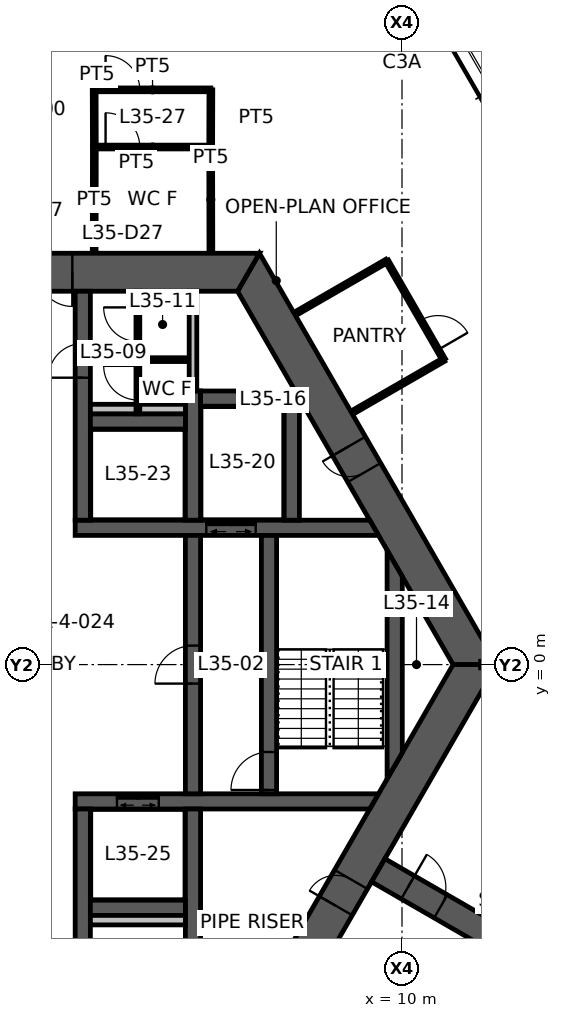
"""IFC4 building model, lengths in metres.
Left out: names, types, materials, properties, quantities, classifications, styles, units other than length and angle.
Written with IfcOpenShell. Run it as: python <this file> out.ifc"""

import sys

from ifc_helpers import new_model, si_unit, direction, frame, frame_2d, origin, place, context, subcontext, project, spatial, polyline, rectangle, outline, extrude, element, fill, save


model = new_model("IFC4")
c1 = context("Model", 3, precision=1e-05, world=origin(), true_north=direction((0.0, 1.0)))
c2 = subcontext(c1, "Body", "Model", "MODEL_VIEW")
j1 = project(units=[si_unit("LENGTHUNIT", "METRE"), si_unit("PLANEANGLEUNIT", "RADIAN")], contexts=[c1])
p1 = place(None, origin())
s1 = spatial("IfcSite", under=j1, at=p1, CompositionType="ELEMENT")
p2 = place(p1, origin())
s2 = spatial("IfcBuilding", under=s1, at=p2, CompositionType="ELEMENT")
p3 = place(p2, frame((0.0, 0.0, 140.9)))
s3 = spatial("IfcBuildingStorey", under=s2, at=p3, CompositionType="ELEMENT", Elevation=140.9)
p4 = place(p3, frame((11.922, 0.0, 0.0), z_axis=(0.0, 0.0, 1.0), x_axis=(-0.500004296715, 0.866022923061, 0.0)))
e1 = element("IfcWall", 1, at=p4, inside=s3, PredefinedType="SHEAR", context=c2, shape_type="SweptSolid", body=[
    extrude(outline(polyline([(-0.289, -0.5), (5.835, -0.5), (6.635, -0.5), (12.211, -0.5), (11.634, 0.5), (6.635, 0.5), (5.835, 0.5), (0.289, 0.5), (-0.289, -0.5)])), origin(), (0.0, 0.0, 1.0), 3.9),
])
p5 = place(p4, frame((5.835, 0.0, 0.0)))
e2 = element("IfcOpeningElement", 2, at=p5, cuts=e1, PredefinedType="OPENING", context=c2, shape_type="SweptSolid", body=[
    extrude(rectangle(XDim=0.8, YDim=2.1, at=frame_2d((0.4, 1.05))), frame((0.0, 0.51, 0.0), z_axis=(0.0, -1.0, 0.0), x_axis=(1.0, 0.0, 0.0)), (0.0, 0.0, 1.0), 1.02),
])
p6 = place(p3, frame((5.961, 10.325, 0.0), z_axis=(0.0, 0.0, 1.0), x_axis=(-1.0, 0.0, 0.0)))
e3 = element("IfcWall", 3, at=p6, inside=s3, PredefinedType="SHEAR", context=c2, shape_type="SweptSolid", body=[
    extrude(outline(polyline([(-0.289, -0.5), (4.636, -0.5), (5.536, -0.5), (6.386, -0.5), (7.286, -0.5), (12.211, -0.5), (11.634, 0.5), (7.286, 0.5), (6.386, 0.5), (5.536, 0.5), (4.636, 0.5), (0.289, 0.5), (-0.289, -0.5)])), origin(), (0.0, 0.0, 1.0), 3.9),
])
p7 = place(p6, frame((6.386, 0.0, 0.0)))
e4 = element("IfcOpeningElement", 4, at=p7, cuts=e3, PredefinedType="OPENING", context=c2, shape_type="SweptSolid", body=[
    extrude(rectangle(XDim=0.9, YDim=2.1, at=frame_2d((0.45, 1.05))), frame((0.0, 0.51, 0.0), z_axis=(0.0, -1.0, 0.0), x_axis=(1.0, 0.0, 0.0)), (0.0, 0.0, 1.0), 1.02),
])
p8 = place(p6, frame((4.636, 0.0, 0.0)))
e5 = element("IfcOpeningElement", 5, at=p8, cuts=e3, PredefinedType="OPENING", context=c2, shape_type="SweptSolid", body=[
    extrude(rectangle(XDim=0.9, YDim=2.1, at=frame_2d((0.45, 1.05))), frame((0.0, 0.51, 0.0), z_axis=(0.0, -1.0, 0.0), x_axis=(1.0, 0.0, 0.0)), (0.0, 0.0, 1.0), 1.02),
])
p9 = place(p3, frame((5.961, -10.325, 0.0), z_axis=(0.0, 0.0, 1.0), x_axis=(0.500004296715, 0.866022923061, 0.0)))
e6 = element("IfcWall", 6, at=p9, inside=s3, PredefinedType="SHEAR", context=c2, shape_type="SweptSolid", body=[
    extrude(outline(polyline([(-0.289, -0.5), (4.594, -0.5), (5.394, -0.5), (12.211, -0.5), (11.634, 0.5), (5.394, 0.5), (4.594, 0.5), (0.289, 0.5), (-0.289, -0.5)])), origin(), (0.0, 0.0, 1.0), 3.9),
])
p10 = place(p9, frame((4.594, 0.0, 0.0)))
e7 = element("IfcOpeningElement", 7, at=p10, cuts=e6, PredefinedType="OPENING", context=c2, shape_type="SweptSolid", body=[
    extrude(rectangle(XDim=0.8, YDim=2.1, at=frame_2d((0.4, 1.05))), frame((0.0, 0.51, 0.0), z_axis=(0.0, -1.0, 0.0), x_axis=(1.0, 0.0, 0.0)), (0.0, 0.0, 1.0), 1.02),
])
p11 = place(p3, frame((9.375, -5.413, 0.0), z_axis=(0.0, 0.0, 1.0), x_axis=(0.866032377459, -0.499987921047, 0.0)))
e8 = element("IfcWall", 8, at=p11, inside=s3, PredefinedType="SHEAR", context=c2, shape_type="SweptSolid", body=[
    extrude(rectangle(XDim=7.696, YDim=0.7, at=frame_2d((3.848, 0.0))), origin(), (0.0, 0.0, 1.0), 3.9),
])
p12 = place(p11, frame((0.9, 0.0, 0.0)))
e9 = element("IfcOpeningElement", 9, at=p12, cuts=e8, PredefinedType="OPENING", context=c2, shape_type="SweptSolid", body=[
    extrude(rectangle(XDim=1.0, YDim=2.1, at=frame_2d((0.5, 1.05))), frame((0.0, 0.36, 0.0), z_axis=(0.0, -1.0, 0.0), x_axis=(1.0, 0.0, 0.0)), (0.0, 0.0, 1.0), 0.72),
])
p13 = place(p3, frame((1.4, 3.6, 0.0), z_axis=(0.0, 0.0, 1.0), x_axis=(1.0, 0.0, 0.0)))
e10 = element("IfcWall", 10, at=p13, inside=s3, PredefinedType="SHEAR", context=c2, shape_type="SweptSolid", body=[
    extrude(outline(polyline([(0.0, -0.2), (3.45, -0.2), (4.75, -0.2), (7.982, -0.2), (7.751, 0.2), (4.75, 0.2), (3.45, 0.2), (0.0, 0.2), (0.0, -0.2)])), origin(), (0.0, 0.0, 1.0), 3.9),
])
p14 = place(p13, frame((3.45, 0.0, 0.0)))
e11 = element("IfcOpeningElement", 11, at=p14, cuts=e10, PredefinedType="OPENING", context=c2, shape_type="SweptSolid", body=[
    extrude(rectangle(XDim=1.3, YDim=2.1, at=frame_2d((0.65, 1.05))), frame((0.0, 0.21, 0.0), z_axis=(0.0, -1.0, 0.0), x_axis=(1.0, 0.0, 0.0)), (0.0, 0.0, 1.0), 0.42),
])
p15 = place(p3, frame((1.4, -3.6, 0.0), z_axis=(0.0, 0.0, 1.0), x_axis=(1.0, 0.0, 0.0)))
e12 = element("IfcWall", 12, at=p15, inside=s3, PredefinedType="SHEAR", context=c2, shape_type="SweptSolid", body=[
    extrude(outline(polyline([(0.0, -0.2), (1.1, -0.2), (2.2, -0.2), (7.751, -0.2), (7.982, 0.2), (2.2, 0.2), (1.1, 0.2), (0.0, 0.2), (0.0, -0.2)])), origin(), (0.0, 0.0, 1.0), 3.9),
])
p16 = place(p15, frame((1.1, 0.0, 0.0)))
e13 = element("IfcOpeningElement", 13, at=p16, cuts=e12, PredefinedType="OPENING", context=c2, shape_type="SweptSolid", body=[
    extrude(rectangle(XDim=1.1, YDim=2.1, at=frame_2d((0.55, 1.05))), frame((0.0, 0.21, 0.0), z_axis=(0.0, -1.0, 0.0), x_axis=(1.0, 0.0, 0.0)), (0.0, 0.0, 1.0), 0.42),
])
p17 = place(p3, frame((1.6, 3.8, 0.0), z_axis=(0.0, 0.0, 1.0), x_axis=(0.0, 1.0, 0.0)))
e14 = element("IfcWall", 14, at=p17, inside=s3, PredefinedType="SHEAR", context=c2, shape_type="SweptSolid", body=[
    extrude(rectangle(XDim=6.025, YDim=0.4, at=frame_2d((3.012, 0.0))), origin(), (0.0, 0.0, 1.0), 3.9),
])
p18 = place(p17, frame((3.75, 0.0, 0.0)))
e15 = element("IfcOpeningElement", 15, at=p18, cuts=e14, PredefinedType="OPENING", context=c2, shape_type="SweptSolid", body=[
    extrude(rectangle(XDim=0.9, YDim=2.1, at=frame_2d((0.45, 1.05))), frame((0.0, 0.21, 0.0), z_axis=(0.0, -1.0, 0.0), x_axis=(1.0, 0.0, 0.0)), (0.0, 0.0, 1.0), 0.42),
])
p19 = place(p3, frame((1.6, -3.8, 0.0), z_axis=(0.0, 0.0, 1.0), x_axis=(0.0, -1.0, 0.0)))
e16 = element("IfcWall", 16, at=p19, inside=s3, PredefinedType="SHEAR", context=c2, shape_type="SweptSolid", body=[
    extrude(rectangle(XDim=6.025, YDim=0.4, at=frame_2d((3.012, 0.0))), origin(), (0.0, 0.0, 1.0), 3.9),
])
p20 = place(p19, frame((3.6, 0.0, 0.0)))
e17 = element("IfcOpeningElement", 17, at=p20, cuts=e16, PredefinedType="OPENING", context=c2, shape_type="SweptSolid", body=[
    extrude(rectangle(XDim=1.2, YDim=2.1, at=frame_2d((0.6, 1.05))), frame((0.0, 0.21, 0.0), z_axis=(0.0, -1.0, 0.0), x_axis=(1.0, 0.0, 0.0)), (0.0, 0.0, 1.0), 0.42),
])
p21 = place(p3, frame((4.5, -3.4, 0.0), z_axis=(0.0, 0.0, 1.0), x_axis=(0.0, 1.0, 0.0)))
e18 = element("IfcWall", 18, at=p21, inside=s3, PredefinedType="SHEAR", context=c2, shape_type="SweptSolid", body=[
    extrude(rectangle(XDim=6.8, YDim=0.4, at=frame_2d((3.4, 0.0))), origin(), (0.0, 0.0, 1.0), 3.9),
])
p22 = place(p21, frame((2.9, 0.0, 0.0)))
e19 = element("IfcOpeningElement", 19, at=p22, cuts=e18, PredefinedType="OPENING", context=c2, shape_type="SweptSolid", body=[
    extrude(rectangle(XDim=1.0, YDim=2.1, at=frame_2d((0.5, 1.05))), frame((0.0, 0.21, 0.0), z_axis=(0.0, -1.0, 0.0), x_axis=(1.0, 0.0, 0.0)), (0.0, 0.0, 1.0), 0.42),
])
p23 = place(p3, frame((6.5, -3.4, 0.0), z_axis=(0.0, 0.0, 1.0), x_axis=(0.0, 1.0, 0.0)))
e20 = element("IfcWall", 20, at=p23, inside=s3, PredefinedType="SHEAR", context=c2, shape_type="SweptSolid", body=[
    extrude(rectangle(XDim=6.8, YDim=0.4, at=frame_2d((3.4, 0.0))), origin(), (0.0, 0.0, 1.0), 3.9),
])
p24 = place(p23, frame((0.1, 0.0, 0.0)))
e21 = element("IfcOpeningElement", 21, at=p24, cuts=e20, PredefinedType="OPENING", context=c2, shape_type="SweptSolid", body=[
    extrude(rectangle(XDim=1.0, YDim=2.1, at=frame_2d((0.5, 1.05))), frame((0.0, 0.21, 0.0), z_axis=(0.0, -1.0, 0.0), x_axis=(1.0, 0.0, 0.0)), (0.0, 0.0, 1.0), 0.42),
])
p25 = place(p3, frame((4.5, 3.8, 0.0), z_axis=(0.0, 0.0, 1.0), x_axis=(0.0, 1.0, 0.0)))
e22 = element("IfcWall", 22, at=p25, inside=s3, PredefinedType="SHEAR", context=c2, shape_type="SweptSolid", body=[
    extrude(rectangle(XDim=3.4, YDim=0.4, at=frame_2d((1.7, 0.0))), origin(), (0.0, 0.0, 1.0), 3.9),
])
p26 = place(p3, frame((4.5, -3.8, 0.0), z_axis=(0.0, 0.0, 1.0), x_axis=(0.0, -1.0, 0.0)))
e23 = element("IfcWall", 23, at=p26, inside=s3, PredefinedType="SHEAR", context=c2, shape_type="SweptSolid", body=[
    extrude(rectangle(XDim=6.025, YDim=0.4, at=frame_2d((3.012, 0.0))), origin(), (0.0, 0.0, 1.0), 3.9),
])
for number, where, z_axis, x_axis in (
    (24, (1.8, 6.4, 0.0), (0.0, 0.0, 1.0), (1.0, 0.0, 0.0)),
    (25, (1.8, -6.4, 0.0), (0.0, 0.0, 1.0), (1.0, 0.0, 0.0)),
):
    element("IfcWall", number, at=place(p3, frame(where, z_axis=z_axis, x_axis=x_axis)), inside=s3, PredefinedType="SHEAR", context=c2, shape_type="SweptSolid", body=[
        extrude(rectangle(XDim=2.5, YDim=0.4, at=frame_2d((1.25, 0.0))), origin(), (0.0, 0.0, 1.0), 3.9),
    ])
p27 = place(p3, frame((4.7, 7.0, 0.0), z_axis=(0.0, 0.0, 1.0), x_axis=(1.0, 0.0, 0.0)))
e26 = element("IfcWall", 26, at=p27, inside=s3, PredefinedType="SHEAR", context=c2, shape_type="SweptSolid", body=[
    extrude(rectangle(XDim=2.2, YDim=0.4, at=frame_2d((1.1, 0.0))), origin(), (0.0, 0.0, 1.0), 3.9),
])
p28 = place(p3, frame((7.1, 3.8, 0.0), z_axis=(0.0, 0.0, 1.0), x_axis=(0.0, 1.0, 0.0)))
e27 = element("IfcWall", 27, at=p28, inside=s3, PredefinedType="SHEAR", context=c2, shape_type="SweptSolid", body=[
    extrude(outline(polyline([(0.0, -0.2), (3.206, -0.2), (3.4, 0.0), (3.4, 0.2), (0.0, 0.2), (0.0, -0.2)])), origin(), (0.0, 0.0, 1.0), 3.9),
])
p29 = place(p3, frame((9.808, -2.662, 0.0), z_axis=(0.0, 0.0, 1.0), x_axis=(0.0, 1.0, 0.0)))
e28 = element("IfcWall", 28, at=p29, inside=s3, PredefinedType="SHEAR", context=c2, shape_type="SweptSolid", body=[
    extrude(outline(polyline([(0.346, -0.2), (4.978, -0.2), (5.671, 0.2), (-0.346, 0.2), (0.346, -0.2)])), origin(), (0.0, 0.0, 1.0), 3.9),
])
p30 = place(p3, frame((4.5, 7.2, 0.0), z_axis=(0.0, 0.0, 1.0), x_axis=(0.0, 1.0, 0.0)))
e29 = element("IfcWall", 29, at=p30, inside=s3, PredefinedType="STANDARD", context=c2, shape_type="SweptSolid", body=[
    extrude(rectangle(XDim=2.625, YDim=0.2, at=frame_2d((1.312, 0.0))), origin(), (0.0, 0.0, 1.0), 3.9),
])
for number, where, z_axis, x_axis in (
    (30, (1.8, 6.725, 0.0), (0.0, 0.0, 1.0), (1.0, 0.0, 0.0)),
    (31, (1.8, -6.725, 0.0), (0.0, 0.0, 1.0), (1.0, 0.0, 0.0)),
):
    element("IfcWall", number, at=place(p3, frame(where, z_axis=z_axis, x_axis=x_axis)), inside=s3, PredefinedType="PLUMBINGWALL", context=c2, shape_type="SweptSolid", body=[
        extrude(rectangle(XDim=2.5, YDim=0.25, at=frame_2d((1.25, 0.0))), origin(), (0.0, 0.0, 1.0), 3.9),
    ])
p31 = place(p3, frame((3.05, 6.6, 0.0), z_axis=(0.0, 0.0, 1.0), x_axis=(0.0, 1.0, 0.0)))
e32 = element("IfcWall", 32, at=p31, inside=s3, PredefinedType="PARTITIONING", context=c2, shape_type="SweptSolid", body=[
    extrude(rectangle(XDim=3.225, YDim=0.1, at=frame_2d((1.612, 0.0))), origin(), (0.0, 0.0, 1.0), 2.95),
])
p32 = place(p31, frame((0.363, 0.0, 0.0)))
e33 = element("IfcOpeningElement", 33, at=p32, cuts=e32, PredefinedType="OPENING", context=c2, shape_type="SweptSolid", body=[
    extrude(rectangle(XDim=0.9, YDim=2.1, at=frame_2d((0.45, 1.05))), frame((0.0, 0.06, 0.0), z_axis=(0.0, -1.0, 0.0), x_axis=(1.0, 0.0, 0.0)), (0.0, 0.0, 1.0), 0.12),
])
p33 = place(p31, frame((1.9, 0.0, 0.0)))
e34 = element("IfcOpeningElement", 34, at=p33, cuts=e32, PredefinedType="OPENING", context=c2, shape_type="SweptSolid", body=[
    extrude(rectangle(XDim=0.9, YDim=2.1, at=frame_2d((0.45, 1.05))), frame((0.0, 0.06, 0.0), z_axis=(0.0, -1.0, 0.0), x_axis=(1.0, 0.0, 0.0)), (0.0, 0.0, 1.0), 0.12),
])
p34 = place(p3, frame((3.1, 8.025, 0.0), z_axis=(0.0, 0.0, 1.0), x_axis=(1.0, 0.0, 0.0)))
e35 = element("IfcWall", 35, at=p34, inside=s3, PredefinedType="PARTITIONING", context=c2, shape_type="SweptSolid", body=[
    extrude(rectangle(XDim=1.2, YDim=0.1, at=frame_2d((0.6, 0.0))), origin(), (0.0, 0.0, 1.0), 2.95),
])
p35 = place(p3, frame((12.07, 0.0, 0.0), z_axis=(0.0, 0.0, 1.0), x_axis=(1.0, 0.0, 0.0)))
e36 = element("IfcWall", 36, at=p35, inside=s3, PredefinedType="PARTITIONING", context=c2, shape_type="SweptSolid", body=[
    extrude(rectangle(XDim=7.93, YDim=0.175, at=frame_2d((3.965, 0.0))), origin(), (0.0, 0.0, 1.0), 3.05),
])
p36 = place(p35, frame((1.13, 0.0, 0.0)))
e37 = element("IfcOpeningElement", 37, at=p36, cuts=e36, PredefinedType="OPENING", context=c2, shape_type="SweptSolid", body=[
    extrude(rectangle(XDim=1.0, YDim=2.1, at=frame_2d((0.5, 1.05))), frame((0.0, 0.098, 0.0), z_axis=(0.0, -1.0, 0.0), x_axis=(1.0, 0.0, 0.0)), (0.0, 0.0, 1.0), 0.195),
])
p37 = place(p3, frame((1.9, 13.62, 0.0), z_axis=(0.0, 0.0, 1.0), x_axis=(1.0, 0.0, 0.0)))
e38 = element("IfcWall", 38, at=p37, inside=s3, PredefinedType="PARTITIONING", context=c2, shape_type="SweptSolid", body=[
    extrude(rectangle(XDim=3.071, YDim=0.1, at=frame_2d((1.536, 0.0))), origin(), (0.0, 0.0, 1.0), 2.95),
])
p38 = place(p37, frame((0.3, 0.0, 0.0)))
e39 = element("IfcOpeningElement", 39, at=p38, cuts=e38, PredefinedType="OPENING", context=c2, shape_type="SweptSolid", body=[
    extrude(rectangle(XDim=0.9, YDim=2.1, at=frame_2d((0.45, 1.05))), frame((0.0, 0.06, 0.0), z_axis=(0.0, -1.0, 0.0), x_axis=(1.0, 0.0, 0.0)), (0.0, 0.0, 1.0), 0.12),
])
for number, where, z_axis, x_axis in (
    (40, (1.9, 10.845, 0.0), (0.0, 0.0, 1.0), (0.002, 1.0, 0.0)),
    (41, (4.966, 13.625, 0.0), (0.0, 0.0, 1.0), (0.002, -1.0, 0.0)),
):
    element("IfcWall", number, at=place(p3, frame(where, z_axis=z_axis, x_axis=x_axis)), inside=s3, PredefinedType="PARTITIONING", context=c2, shape_type="SweptSolid", body=[
        extrude(rectangle(XDim=2.78, YDim=0.1, at=frame_2d((1.39, 0.0))), origin(), (0.0, 0.0, 1.0), 2.95),
    ])
p39 = place(p3, frame((1.9, 15.125, 0.0), z_axis=(0.0, 0.0, 1.0), x_axis=(1.0, 0.0, 0.0)))
e42 = element("IfcWall", 42, at=p39, inside=s3, PredefinedType="PARTITIONING", context=c2, shape_type="SweptSolid", body=[
    extrude(rectangle(XDim=3.071, YDim=0.1, at=frame_2d((1.536, 0.0))), origin(), (0.0, 0.0, 1.0), 2.95),
])
p40 = place(p39, frame((0.3, 0.0, 0.0)))
e43 = element("IfcOpeningElement", 43, at=p40, cuts=e42, PredefinedType="OPENING", context=c2, shape_type="SweptSolid", body=[
    extrude(rectangle(XDim=0.9, YDim=2.1, at=frame_2d((0.45, 1.05))), frame((0.0, 0.06, 0.0), z_axis=(0.0, -1.0, 0.0), x_axis=(1.0, 0.0, 0.0)), (0.0, 0.0, 1.0), 0.12),
])
for number, where, z_axis, x_axis in (
    (44, (1.905, 13.625, 0.0), (0.0, 0.0, 1.0), (-0.003, 1.0, 0.0)),
    (45, (4.971, 15.125, 0.0), (0.0, 0.0, 1.0), (-0.003, -1.0, 0.0)),
):
    element("IfcWall", number, at=place(p3, frame(where, z_axis=z_axis, x_axis=x_axis)), inside=s3, PredefinedType="PARTITIONING", context=c2, shape_type="SweptSolid", body=[
        extrude(rectangle(XDim=1.5, YDim=0.1, at=frame_2d((0.75, 0.0))), origin(), (0.0, 0.0, 1.0), 2.95),
    ])
p41 = place(p3, frame((7.192, 9.233, 0.0), z_axis=(0.0, 0.0, 1.0), x_axis=(0.866018876994, 0.500011304563, 0.0)))
e46 = element("IfcWall", 46, at=p41, inside=s3, PredefinedType="PARTITIONING", context=c2, shape_type="SweptSolid", body=[
    extrude(rectangle(XDim=2.78, YDim=0.1, at=frame_2d((1.39, 0.0))), origin(), (0.0, 0.0, 1.0), 2.95),
])
p42 = place(p3, frame((9.6, 10.623, 0.0), z_axis=(0.0, 0.0, 1.0), x_axis=(0.499990139034, -0.866031096941, 0.0)))
e47 = element("IfcWall", 47, at=p42, inside=s3, PredefinedType="PARTITIONING", context=c2, shape_type="SweptSolid", body=[
    extrude(rectangle(XDim=3.0, YDim=0.1, at=frame_2d((1.5, 0.0))), origin(), (0.0, 0.0, 1.0), 2.95),
])
p43 = place(p42, frame((1.8, 0.0, 0.0)))
e48 = element("IfcOpeningElement", 48, at=p43, cuts=e47, PredefinedType="OPENING", context=c2, shape_type="SweptSolid", body=[
    extrude(rectangle(XDim=0.9, YDim=2.1, at=frame_2d((0.45, 1.05))), frame((0.0, 0.06, 0.0), z_axis=(0.0, -1.0, 0.0), x_axis=(1.0, 0.0, 0.0)), (0.0, 0.0, 1.0), 0.12),
])
p44 = place(p3, frame((11.1, 8.025, 0.0), z_axis=(0.0, 0.0, 1.0), x_axis=(-0.866056901187, -0.49994544093, 0.0)))
e49 = element("IfcWall", 49, at=p44, inside=s3, PredefinedType="PARTITIONING", context=c2, shape_type="SweptSolid", body=[
    extrude(rectangle(XDim=2.78, YDim=0.1, at=frame_2d((1.39, 0.0))), origin(), (0.0, 0.0, 1.0), 2.95),
])
p45 = place(p8, origin())
e50 = element("IfcDoor", 50, at=p45, inside=s3, OperationType="SINGLE_SWING_LEFT", PredefinedType="DOOR", context=c2, shape_type="SweptSolid", body=[
    extrude(rectangle(XDim=0.9, YDim=2.1, at=frame_2d((0.45, 1.05))), frame((0.0, 0.025, 0.0), z_axis=(0.0, -1.0, 0.0), x_axis=(1.0, 0.0, 0.0)), (0.0, 0.0, 1.0), 0.05),
])
fill(e5, e50)
p46 = place(p5, origin())
e51 = element("IfcDoor", 51, at=p46, inside=s3, OperationType="SINGLE_SWING_RIGHT", PredefinedType="DOOR", context=c2, shape_type="SweptSolid", body=[
    extrude(rectangle(XDim=0.8, YDim=2.1, at=frame_2d((0.4, 1.05))), frame((0.0, 0.025, 0.0), z_axis=(0.0, -1.0, 0.0), x_axis=(1.0, 0.0, 0.0)), (0.0, 0.0, 1.0), 0.05),
])
fill(e2, e51)
p47 = place(p10, origin())
e52 = element("IfcDoor", 52, at=p47, inside=s3, OperationType="SINGLE_SWING_LEFT", PredefinedType="DOOR", context=c2, shape_type="SweptSolid", body=[
    extrude(rectangle(XDim=0.8, YDim=2.1, at=frame_2d((0.4, 1.05))), frame((0.0, 0.025, 0.0), z_axis=(0.0, -1.0, 0.0), x_axis=(1.0, 0.0, 0.0)), (0.0, 0.0, 1.0), 0.05),
])
fill(e7, e52)
p48 = place(p22, origin())
e53 = element("IfcDoor", 53, at=p48, inside=s3, OperationType="SINGLE_SWING_LEFT", PredefinedType="DOOR", context=c2, shape_type="SweptSolid", body=[
    extrude(rectangle(XDim=1.0, YDim=2.1, at=frame_2d((0.5, 1.05))), frame((0.0, 0.025, 0.0), z_axis=(0.0, -1.0, 0.0), x_axis=(1.0, 0.0, 0.0)), (0.0, 0.0, 1.0), 0.05),
])
fill(e19, e53)
p49 = place(p24, origin())
e54 = element("IfcDoor", 54, at=p49, inside=s3, OperationType="SINGLE_SWING_LEFT", PredefinedType="DOOR", context=c2, shape_type="SweptSolid", body=[
    extrude(rectangle(XDim=1.0, YDim=2.1, at=frame_2d((0.5, 1.05))), frame((0.0, 0.025, 0.0), z_axis=(0.0, -1.0, 0.0), x_axis=(1.0, 0.0, 0.0)), (0.0, 0.0, 1.0), 0.05),
])
fill(e21, e54)
p50 = place(p18, origin())
e55 = element("IfcDoor", 55, at=p50, inside=s3, OperationType="SINGLE_SWING_LEFT", PredefinedType="DOOR", context=c2, shape_type="SweptSolid", body=[
    extrude(rectangle(XDim=0.9, YDim=2.1, at=frame_2d((0.45, 1.05))), frame((0.0, 0.025, 0.0), z_axis=(0.0, -1.0, 0.0), x_axis=(1.0, 0.0, 0.0)), (0.0, 0.0, 1.0), 0.05),
])
fill(e15, e55)
p51 = place(p12, origin())
e56 = element("IfcDoor", 56, at=p51, inside=s3, OperationType="SINGLE_SWING_LEFT", PredefinedType="DOOR", context=c2, shape_type="SweptSolid", body=[
    extrude(rectangle(XDim=1.0, YDim=2.1, at=frame_2d((0.5, 1.05))), frame((0.0, 0.025, 0.0), z_axis=(0.0, -1.0, 0.0), x_axis=(1.0, 0.0, 0.0)), (0.0, 0.0, 1.0), 0.05),
])
fill(e9, e56)
p52 = place(p32, origin())
e57 = element("IfcDoor", 57, at=p52, inside=s3, OperationType="SINGLE_SWING_RIGHT", PredefinedType="DOOR", context=c2, shape_type="SweptSolid", body=[
    extrude(rectangle(XDim=0.9, YDim=2.1, at=frame_2d((0.45, 1.05))), frame((0.0, 0.025, 0.0), z_axis=(0.0, -1.0, 0.0), x_axis=(1.0, 0.0, 0.0)), (0.0, 0.0, 1.0), 0.05),
])
fill(e33, e57)
p53 = place(p33, origin())
e58 = element("IfcDoor", 58, at=p53, inside=s3, OperationType="SINGLE_SWING_RIGHT", PredefinedType="DOOR", context=c2, shape_type="SweptSolid", body=[
    extrude(rectangle(XDim=0.9, YDim=2.1, at=frame_2d((0.45, 1.05))), frame((0.0, 0.025, 0.0), z_axis=(0.0, -1.0, 0.0), x_axis=(1.0, 0.0, 0.0)), (0.0, 0.0, 1.0), 0.05),
])
fill(e34, e58)
p54 = place(p38, origin())
e59 = element("IfcDoor", 59, at=p54, inside=s3, OperationType="SINGLE_SWING_LEFT", PredefinedType="DOOR", context=c2, shape_type="SweptSolid", body=[
    extrude(rectangle(XDim=0.9, YDim=2.1, at=frame_2d((0.45, 1.05))), frame((0.0, 0.025, 0.0), z_axis=(0.0, -1.0, 0.0), x_axis=(1.0, 0.0, 0.0)), (0.0, 0.0, 1.0), 0.05),
])
fill(e39, e59)
p55 = place(p40, origin())
e60 = element("IfcDoor", 60, at=p55, inside=s3, OperationType="SINGLE_SWING_LEFT", PredefinedType="DOOR", context=c2, shape_type="SweptSolid", body=[
    extrude(rectangle(XDim=0.9, YDim=2.1, at=frame_2d((0.45, 1.05))), frame((0.0, 0.025, 0.0), z_axis=(0.0, -1.0, 0.0), x_axis=(1.0, 0.0, 0.0)), (0.0, 0.0, 1.0), 0.05),
])
fill(e43, e60)
p56 = place(p43, origin())
e61 = element("IfcDoor", 61, at=p56, inside=s3, OperationType="SINGLE_SWING_RIGHT", PredefinedType="DOOR", context=c2, shape_type="SweptSolid", body=[
    extrude(rectangle(XDim=0.9, YDim=2.1, at=frame_2d((0.45, 1.05))), frame((0.0, 0.025, 0.0), z_axis=(0.0, -1.0, 0.0), x_axis=(1.0, 0.0, 0.0)), (0.0, 0.0, 1.0), 0.05),
])
fill(e48, e61)
p57 = place(p16, origin())
e62 = element("IfcDoor", 62, at=p57, inside=s3, OperationType="DOUBLE_DOOR_SLIDING", PredefinedType="DOOR", context=c2, shape_type="SweptSolid", body=[
    extrude(rectangle(XDim=1.1, YDim=2.1, at=frame_2d((0.55, 1.05))), frame((0.0, 0.025, 0.0), z_axis=(0.0, -1.0, 0.0), x_axis=(1.0, 0.0, 0.0)), (0.0, 0.0, 1.0), 0.05),
])
fill(e13, e62)
p58 = place(p14, origin())
e63 = element("IfcDoor", 63, at=p58, inside=s3, OperationType="DOUBLE_DOOR_SLIDING", PredefinedType="DOOR", context=c2, shape_type="SweptSolid", body=[
    extrude(rectangle(XDim=1.3, YDim=2.1, at=frame_2d((0.65, 1.05))), frame((0.0, 0.025, 0.0), z_axis=(0.0, -1.0, 0.0), x_axis=(1.0, 0.0, 0.0)), (0.0, 0.0, 1.0), 0.05),
])
fill(e11, e63)
save(model, sys.argv[1])
